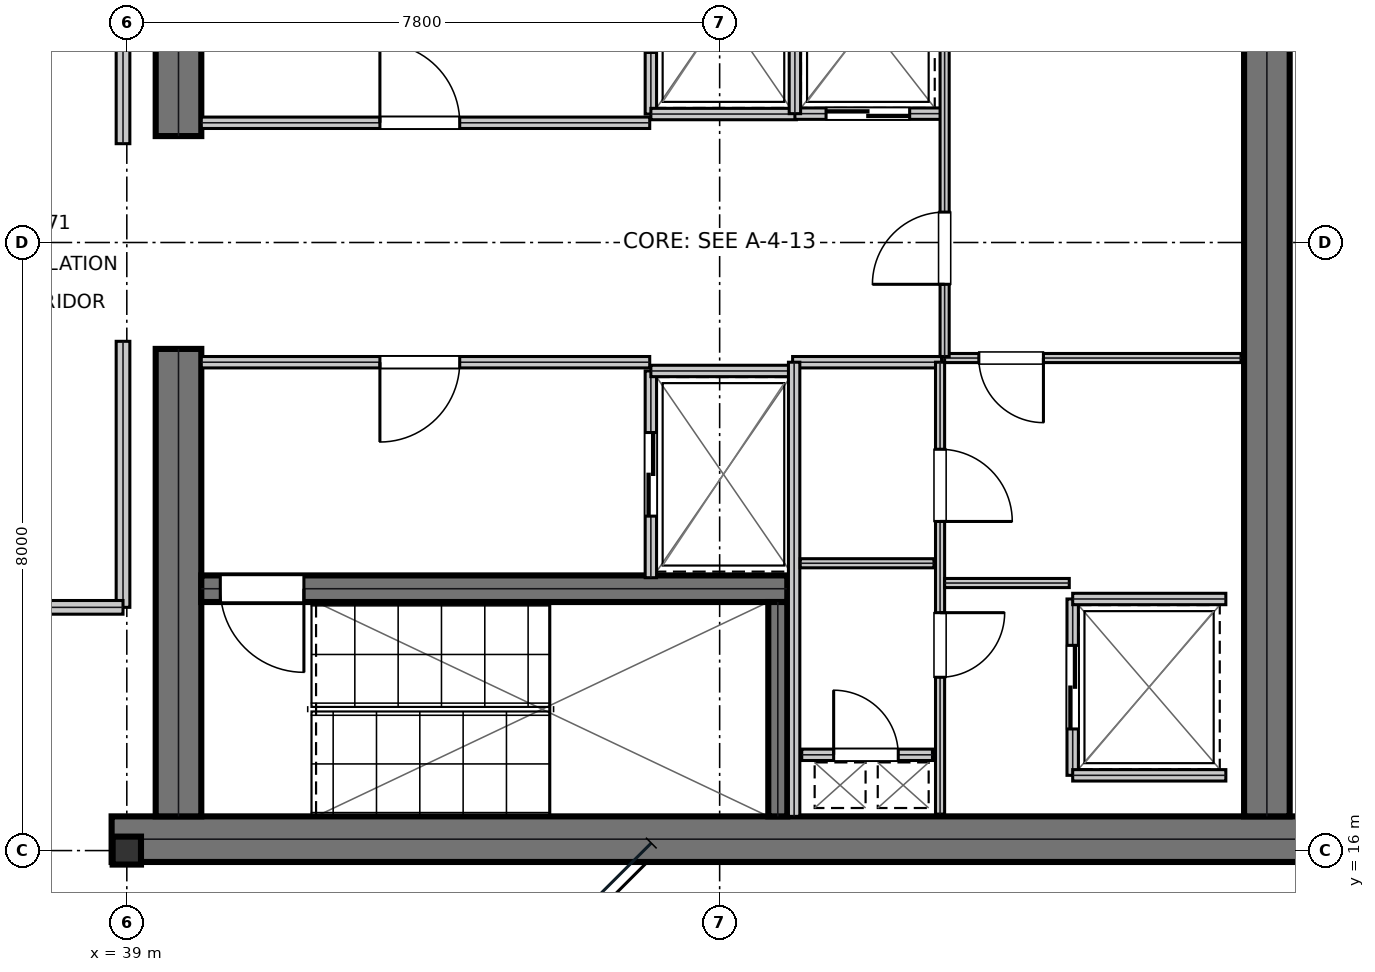
"""IFC4 building model, lengths in metres.
Left out: names, types, materials, properties, quantities, classifications, styles, units other than length and angle.
Written with IfcOpenShell. Run it as: python <this file> out.ifc"""

import sys

from ifc_helpers import new_model, si_unit, direction, frame, frame_2d, origin, origin_2d, place, context, subcontext, project, spatial, rectangle, i_section, extrude, element, fill, save


model = new_model("IFC4")
c1 = context("Model", 3, precision=1e-05, world=origin(), true_north=direction((0.0, 1.0)))
c2 = subcontext(c1, "Body", "Model", "MODEL_VIEW")
j1 = project(units=[si_unit("LENGTHUNIT", "METRE"), si_unit("PLANEANGLEUNIT", "RADIAN")], contexts=[c1])
p1 = place(None, origin())
s1 = spatial("IfcSite", under=j1, at=p1, CompositionType="ELEMENT")
p2 = place(p1, origin())
s2 = spatial("IfcBuilding", under=s1, at=p2, CompositionType="ELEMENT")
p3 = place(p2, frame((0.0, 0.0, 303.3)))
s3 = spatial("IfcBuildingStorey", under=s2, at=p3, CompositionType="ELEMENT", Elevation=303.3)
p4 = place(p3, frame((38.8, 16.15, 0.0), z_axis=(0.0, 0.0, 1.0), x_axis=(1.0, 0.0, 0.0)))
e1 = element("IfcWall", 1, at=p4, inside=s3, PredefinedType="SHEAR", context=c2, shape_type="SweptSolid", body=[
    extrude(rectangle(XDim=16.0, YDim=0.6, at=frame_2d((8.0, 0.0))), origin(), (0.0, 0.0, 1.0), 3.81),
])
for number, where, z_axis, x_axis in (
    (2, (39.68, 16.45, 0.0), (0.0, 0.0, 1.0), (0.0, 1.0, 0.0)),
    (3, (39.68, 25.4, 0.0), (0.0, 0.0, 1.0), (0.0, 1.0, 0.0)),
):
    element("IfcWall", number, at=place(p3, frame(where, z_axis=z_axis, x_axis=x_axis)), inside=s3, PredefinedType="SHEAR", context=c2, shape_type="SweptSolid", body=[
        extrude(rectangle(XDim=6.15, YDim=0.6, at=frame_2d((3.075, 0.0))), origin(), (0.0, 0.0, 1.0), 3.81),
    ])
p5 = place(p3, frame((54.0, 16.45, 0.0), z_axis=(0.0, 0.0, 1.0), x_axis=(0.0, 1.0, 0.0)))
e4 = element("IfcWall", 4, at=p5, inside=s3, PredefinedType="SHEAR", context=c2, shape_type="SweptSolid", body=[
    extrude(rectangle(XDim=15.1, YDim=0.6, at=frame_2d((7.55, 0.0))), origin(), (0.0, 0.0, 1.0), 3.81),
])
p6 = place(p3, frame((39.98, 19.445, 0.0), z_axis=(0.0, 0.0, 1.0), x_axis=(1.0, 0.0, 0.0)))
e5 = element("IfcWall", 5, at=p6, inside=s3, PredefinedType="SHEAR", context=c2, shape_type="SweptSolid", body=[
    extrude(rectangle(XDim=7.71, YDim=0.35, at=frame_2d((3.855, 0.0))), origin(), (0.0, 0.0, 1.0), 3.81),
])
p7 = place(p6, frame((0.25, 0.0, 0.0)))
e6 = element("IfcOpeningElement", 6, at=p7, cuts=e5, PredefinedType="OPENING", context=c2, shape_type="SweptSolid", body=[
    extrude(rectangle(XDim=1.1, YDim=2.15, at=frame_2d((0.55, 1.075))), frame((0.0, 0.185, 0.0), z_axis=(0.0, -1.0, 0.0), x_axis=(1.0, 0.0, 0.0)), (0.0, 0.0, 1.0), 0.37),
])
p8 = place(p3, frame((47.565, 16.45, 0.0), z_axis=(0.0, 0.0, 1.0), x_axis=(0.0, 1.0, 0.0)))
e7 = element("IfcWall", 7, at=p8, inside=s3, PredefinedType="SHEAR", context=c2, shape_type="SweptSolid", body=[
    extrude(rectangle(XDim=2.82, YDim=0.25, at=frame_2d((1.41, 0.0))), origin(), (0.0, 0.0, 1.0), 3.81),
])
p9 = place(p3, frame((39.0, 16.0, 0.0), z_axis=(0.0, 0.0, 1.0), x_axis=(1.0, 0.0, 0.0)))
e8 = element("IfcColumn", 8, at=p9, inside=s3, PredefinedType="COLUMN", context=c2, shape_type="SweptSolid", body=[
    extrude(i_section(OverallWidth=0.373, OverallDepth=0.368, WebThickness=0.015, FlangeThickness=0.024, at=origin_2d()), origin(), (0.0, 0.0, 1.0), 4.044),
])
p10 = place(p3, frame((39.98, 25.575, 0.0), z_axis=(0.0, 0.0, 1.0), x_axis=(1.0, 0.0, 0.0)))
e9 = element("IfcWall", 9, at=p10, inside=s3, PredefinedType="PARTITIONING", context=c2, shape_type="SweptSolid", body=[
    extrude(rectangle(XDim=5.9, YDim=0.15, at=frame_2d((2.95, 0.0))), origin(), (0.0, 0.0, 1.0), 3.81),
])
p11 = place(p10, frame((2.35, 0.0, 0.0)))
e10 = element("IfcOpeningElement", 10, at=p11, cuts=e9, PredefinedType="OPENING", context=c2, shape_type="SweptSolid", body=[
    extrude(rectangle(XDim=1.05, YDim=2.15, at=frame_2d((0.525, 1.075))), frame((0.0, 0.085, 0.0), z_axis=(0.0, -1.0, 0.0), x_axis=(1.0, 0.0, 0.0)), (0.0, 0.0, 1.0), 0.17),
])
p12 = place(p3, frame((39.98, 22.425, 0.0), z_axis=(0.0, 0.0, 1.0), x_axis=(1.0, 0.0, 0.0)))
e11 = element("IfcWall", 11, at=p12, inside=s3, PredefinedType="PARTITIONING", context=c2, shape_type="SweptSolid", body=[
    extrude(rectangle(XDim=5.9, YDim=0.15, at=frame_2d((2.95, 0.0))), origin(), (0.0, 0.0, 1.0), 3.81),
])
p13 = place(p12, frame((2.35, 0.0, 0.0)))
e12 = element("IfcOpeningElement", 12, at=p13, cuts=e11, PredefinedType="OPENING", context=c2, shape_type="SweptSolid", body=[
    extrude(rectangle(XDim=1.05, YDim=2.15, at=frame_2d((0.525, 1.075))), frame((0.0, 0.085, 0.0), z_axis=(0.0, -1.0, 0.0), x_axis=(1.0, 0.0, 0.0)), (0.0, 0.0, 1.0), 0.17),
])
p14 = place(p3, frame((45.895, 25.69, 0.0), z_axis=(0.0, 0.0, 1.0), x_axis=(0.0, 1.0, 0.0)))
e13 = element("IfcWall", 13, at=p14, inside=s3, PredefinedType="PARTITIONING", context=c2, shape_type="SweptSolid", body=[
    extrude(rectangle(XDim=2.72, YDim=0.15, at=frame_2d((1.36, 0.0))), origin(), (0.0, 0.0, 1.0), 3.81),
])
p15 = place(p14, frame((0.81, 0.0, 0.0)))
e14 = element("IfcOpeningElement", 14, at=p15, cuts=e13, PredefinedType="OPENING", context=c2, shape_type="SweptSolid", body=[
    extrude(rectangle(XDim=1.1, YDim=2.15, at=frame_2d((0.55, 1.075))), frame((0.0, 0.085, 0.0), z_axis=(0.0, -1.0, 0.0), x_axis=(1.0, 0.0, 0.0)), (0.0, 0.0, 1.0), 0.17),
])
p16 = place(p3, frame((45.895, 25.69, 0.0), z_axis=(0.0, 0.0, 1.0), x_axis=(1.0, 0.0, 0.0)))
e15 = element("IfcWall", 15, at=p16, inside=s3, PredefinedType="PARTITIONING", context=c2, shape_type="SweptSolid", body=[
    extrude(rectangle(XDim=1.915, YDim=0.15, at=frame_2d((0.958, 0.0))), origin(), (0.0, 0.0, 1.0), 3.81),
])
p17 = place(p3, frame((45.895, 19.59, 0.0), z_axis=(0.0, 0.0, 1.0), x_axis=(0.0, 1.0, 0.0)))
e16 = element("IfcWall", 16, at=p17, inside=s3, PredefinedType="PARTITIONING", context=c2, shape_type="SweptSolid", body=[
    extrude(rectangle(XDim=2.72, YDim=0.15, at=frame_2d((1.36, 0.0))), origin(), (0.0, 0.0, 1.0), 3.81),
])
p18 = place(p17, frame((0.81, 0.0, 0.0)))
e17 = element("IfcOpeningElement", 17, at=p18, cuts=e16, PredefinedType="OPENING", context=c2, shape_type="SweptSolid", body=[
    extrude(rectangle(XDim=1.1, YDim=2.15, at=frame_2d((0.55, 1.075))), frame((0.0, 0.085, 0.0), z_axis=(0.0, -1.0, 0.0), x_axis=(1.0, 0.0, 0.0)), (0.0, 0.0, 1.0), 0.17),
])
p19 = place(p3, frame((45.895, 22.31, 0.0), z_axis=(0.0, 0.0, 1.0), x_axis=(1.0, 0.0, 0.0)))
e18 = element("IfcWall", 18, at=p19, inside=s3, PredefinedType="PARTITIONING", context=c2, shape_type="SweptSolid", body=[
    extrude(rectangle(XDim=1.915, YDim=0.15, at=frame_2d((0.958, 0.0))), origin(), (0.0, 0.0, 1.0), 3.81),
])
p20 = place(p3, frame((47.79, 25.695, 0.0), z_axis=(0.0, 0.0, 1.0), x_axis=(1.0, 0.0, 0.0)))
e19 = element("IfcWall", 19, at=p20, inside=s3, PredefinedType="PARTITIONING", context=c2, shape_type="SweptSolid", body=[
    extrude(rectangle(XDim=1.92, YDim=0.15, at=frame_2d((0.96, 0.0))), origin(), (0.0, 0.0, 1.0), 3.81),
])
p21 = place(p20, frame((0.41, 0.0, 0.0)))
e20 = element("IfcOpeningElement", 20, at=p21, cuts=e19, PredefinedType="OPENING", context=c2, shape_type="SweptSolid", body=[
    extrude(rectangle(XDim=1.1, YDim=2.15, at=frame_2d((0.55, 1.075))), frame((0.0, 0.085, 0.0), z_axis=(0.0, -1.0, 0.0), x_axis=(1.0, 0.0, 0.0)), (0.0, 0.0, 1.0), 0.17),
])
p22 = place(p3, frame((47.79, 25.695, 0.0), z_axis=(0.0, 0.0, 1.0), x_axis=(0.0, 1.0, 0.0)))
e21 = element("IfcWall", 21, at=p22, inside=s3, PredefinedType="PARTITIONING", context=c2, shape_type="SweptSolid", body=[
    extrude(rectangle(XDim=2.415, YDim=0.15, at=frame_2d((1.208, 0.0))), origin(), (0.0, 0.0, 1.0), 3.81),
])
p23 = place(p3, frame((51.445, 16.99, 0.0), z_axis=(0.0, 0.0, 1.0), x_axis=(0.0, 1.0, 0.0)))
e22 = element("IfcWall", 22, at=p23, inside=s3, PredefinedType="PARTITIONING", context=c2, shape_type="SweptSolid", body=[
    extrude(rectangle(XDim=2.32, YDim=0.15, at=frame_2d((1.16, 0.0))), origin(), (0.0, 0.0, 1.0), 3.81),
])
p24 = place(p23, frame((0.61, 0.0, 0.0)))
e23 = element("IfcOpeningElement", 23, at=p24, cuts=e22, PredefinedType="OPENING", context=c2, shape_type="SweptSolid", body=[
    extrude(rectangle(XDim=1.1, YDim=2.15, at=frame_2d((0.55, 1.075))), frame((0.0, 0.085, 0.0), z_axis=(0.0, -1.0, 0.0), x_axis=(1.0, 0.0, 0.0)), (0.0, 0.0, 1.0), 0.17),
])
for number, where, z_axis, x_axis in (
    (24, (51.445, 16.99, 0.0), (0.0, 0.0, 1.0), (1.0, 0.0, 0.0)),
    (25, (51.445, 19.31, 0.0), (0.0, 0.0, 1.0), (1.0, 0.0, 0.0)),
):
    element("IfcWall", number, at=place(p3, frame(where, z_axis=z_axis, x_axis=x_axis)), inside=s3, PredefinedType="PARTITIONING", context=c2, shape_type="SweptSolid", body=[
        extrude(rectangle(XDim=2.015, YDim=0.15, at=frame_2d((1.007, 0.0))), origin(), (0.0, 0.0, 1.0), 3.81),
    ])
p25 = place(p3, frame((47.88, 17.26, 0.0), z_axis=(0.0, 0.0, 1.0), x_axis=(1.0, 0.0, 0.0)))
e26 = element("IfcWall", 26, at=p25, inside=s3, PredefinedType="PARTITIONING", context=c2, shape_type="SweptSolid", body=[
    extrude(rectangle(XDim=1.72, YDim=0.15, at=frame_2d((0.86, 0.0))), origin(), (0.0, 0.0, 1.0), 3.81),
])
p26 = place(p25, frame((0.42, 0.0, 0.0)))
e27 = element("IfcOpeningElement", 27, at=p26, cuts=e26, PredefinedType="OPENING", context=c2, shape_type="SweptSolid", body=[
    extrude(rectangle(XDim=0.85, YDim=2.15, at=frame_2d((0.425, 1.075))), frame((0.0, 0.085, 0.0), z_axis=(0.0, -1.0, 0.0), x_axis=(1.0, 0.0, 0.0)), (0.0, 0.0, 1.0), 0.17),
])
p27 = place(p3, frame((47.76, 22.425, 0.0), z_axis=(0.0, 0.0, 1.0), x_axis=(1.0, 0.0, 0.0)))
e28 = element("IfcWall", 28, at=p27, inside=s3, PredefinedType="PARTITIONING", context=c2, shape_type="SweptSolid", body=[
    extrude(rectangle(XDim=1.96, YDim=0.15, at=frame_2d((0.98, 0.0))), origin(), (0.0, 0.0, 1.0), 3.81),
])
p28 = place(p3, frame((47.78, 16.45, 0.0), z_axis=(0.0, 0.0, 1.0), x_axis=(0.0, 1.0, 0.0)))
e29 = element("IfcWall", 29, at=p28, inside=s3, PredefinedType="PARTITIONING", context=c2, shape_type="SweptSolid", body=[
    extrude(rectangle(XDim=5.975, YDim=0.15, at=frame_2d((2.988, 0.0))), origin(), (0.0, 0.0, 1.0), 3.81),
])
p29 = place(p3, frame((47.86, 19.78, 0.0), z_axis=(0.0, 0.0, 1.0), x_axis=(1.0, 0.0, 0.0)))
e30 = element("IfcWall", 30, at=p29, inside=s3, PredefinedType="PARTITIONING", context=c2, shape_type="SweptSolid", body=[
    extrude(rectangle(XDim=1.76, YDim=0.12, at=frame_2d((0.88, 0.0))), origin(), (0.0, 0.0, 1.0), 3.81),
])
p30 = place(p3, frame((49.7, 16.48, 0.0), z_axis=(0.0, 0.0, 1.0), x_axis=(0.0, 1.0, 0.0)))
e31 = element("IfcWall", 31, at=p30, inside=s3, PredefinedType="PARTITIONING", context=c2, shape_type="SweptSolid", body=[
    extrude(rectangle(XDim=5.945, YDim=0.12, at=frame_2d((2.973, 0.0))), origin(), (0.0, 0.0, 1.0), 3.81),
])
p31 = place(p30, frame((1.8, 0.0, 0.0)))
e32 = element("IfcOpeningElement", 32, at=p31, cuts=e31, PredefinedType="OPENING", context=c2, shape_type="SweptSolid", body=[
    extrude(rectangle(XDim=0.85, YDim=2.15, at=frame_2d((0.425, 1.075))), frame((0.0, 0.07, 0.0), z_axis=(0.0, -1.0, 0.0), x_axis=(1.0, 0.0, 0.0)), (0.0, 0.0, 1.0), 0.14),
])
p32 = place(p30, frame((3.85, 0.0, 0.0)))
e33 = element("IfcOpeningElement", 33, at=p32, cuts=e31, PredefinedType="OPENING", context=c2, shape_type="SweptSolid", body=[
    extrude(rectangle(XDim=0.95, YDim=2.15, at=frame_2d((0.475, 1.075))), frame((0.0, 0.07, 0.0), z_axis=(0.0, -1.0, 0.0), x_axis=(1.0, 0.0, 0.0)), (0.0, 0.0, 1.0), 0.14),
])
p33 = place(p3, frame((49.76, 22.48, 0.0), z_axis=(0.0, 0.0, 1.0), x_axis=(1.0, 0.0, 0.0)))
e34 = element("IfcWall", 34, at=p33, inside=s3, PredefinedType="PARTITIONING", context=c2, shape_type="SweptSolid", body=[
    extrude(rectangle(XDim=3.9, YDim=0.12, at=frame_2d((1.95, 0.0))), origin(), (0.0, 0.0, 1.0), 3.81),
])
p34 = place(p33, frame((0.45, 0.0, 0.0)))
e35 = element("IfcOpeningElement", 35, at=p34, cuts=e34, PredefinedType="OPENING", context=c2, shape_type="SweptSolid", body=[
    extrude(rectangle(XDim=0.85, YDim=2.15, at=frame_2d((0.425, 1.075))), frame((0.0, 0.07, 0.0), z_axis=(0.0, -1.0, 0.0), x_axis=(1.0, 0.0, 0.0)), (0.0, 0.0, 1.0), 0.14),
])
p35 = place(p3, frame((49.76, 19.52, 0.0), z_axis=(0.0, 0.0, 1.0), x_axis=(1.0, 0.0, 0.0)))
e36 = element("IfcWall", 36, at=p35, inside=s3, PredefinedType="PARTITIONING", context=c2, shape_type="SweptSolid", body=[
    extrude(rectangle(XDim=1.64, YDim=0.12, at=frame_2d((0.82, 0.0))), origin(), (0.0, 0.0, 1.0), 3.81),
])
p36 = place(p3, frame((49.76, 22.5, 0.0), z_axis=(0.0, 0.0, 1.0), x_axis=(0.0, 1.0, 0.0)))
e37 = element("IfcWall", 37, at=p36, inside=s3, PredefinedType="PARTITIONING", context=c2, shape_type="SweptSolid", body=[
    extrude(rectangle(XDim=5.72, YDim=0.12, at=frame_2d((2.86, 0.0))), origin(), (0.0, 0.0, 1.0), 3.81),
])
p37 = place(p36, frame((0.95, 0.0, 0.0)))
e38 = element("IfcOpeningElement", 38, at=p37, cuts=e37, PredefinedType="OPENING", context=c2, shape_type="SweptSolid", body=[
    extrude(rectangle(XDim=0.95, YDim=2.15, at=frame_2d((0.475, 1.075))), frame((0.0, 0.07, 0.0), z_axis=(0.0, -1.0, 0.0), x_axis=(1.0, 0.0, 0.0)), (0.0, 0.0, 1.0), 0.14),
])
p38 = place(p3, frame((38.95, 19.2, 0.0), z_axis=(0.0, 0.0, 1.0), x_axis=(0.0, 1.0, 0.0)))
e39 = element("IfcWall", 39, at=p38, inside=s3, PredefinedType="SOLIDWALL", context=c2, shape_type="SweptSolid", body=[
    extrude(rectangle(XDim=3.5, YDim=0.18, at=frame_2d((1.75, 0.0))), origin(), (0.0, 0.0, 1.0), 3.54),
])
p39 = place(p3, frame((37.05, 19.2, 0.0), z_axis=(0.0, 0.0, 1.0), x_axis=(1.0, 0.0, 0.0)))
e40 = element("IfcWall", 40, at=p39, inside=s3, PredefinedType="SOLIDWALL", context=c2, shape_type="SweptSolid", body=[
    extrude(rectangle(XDim=1.9, YDim=0.18, at=frame_2d((0.95, 0.0))), origin(), (0.0, 0.0, 1.0), 3.81),
])
p40 = place(p3, frame((38.95, 25.3, 0.0), z_axis=(0.0, 0.0, 1.0), x_axis=(0.0, 1.0, 0.0)))
e41 = element("IfcWall", 41, at=p40, inside=s3, PredefinedType="SOLIDWALL", context=c2, shape_type="SweptSolid", body=[
    extrude(rectangle(XDim=3.5, YDim=0.18, at=frame_2d((1.75, 0.0))), origin(), (0.0, 0.0, 1.0), 3.54),
])
p41 = place(p11, origin())
e42 = element("IfcDoor", 42, at=p41, inside=s3, OperationType="SINGLE_SWING_LEFT", PredefinedType="DOOR", context=c2, shape_type="SweptSolid", body=[
    extrude(rectangle(XDim=1.05, YDim=2.15, at=frame_2d((0.525, 1.075))), frame((0.0, 0.025, 0.0), z_axis=(0.0, -1.0, 0.0), x_axis=(1.0, 0.0, 0.0)), (0.0, 0.0, 1.0), 0.05),
])
fill(e10, e42)
p42 = place(p13, frame((1.05, 0.0, 0.0), z_axis=(0.0, 0.0, 1.0), x_axis=(-1.0, 0.0, 0.0)))
e43 = element("IfcDoor", 43, at=p42, inside=s3, OperationType="SINGLE_SWING_RIGHT", PredefinedType="DOOR", context=c2, shape_type="SweptSolid", body=[
    extrude(rectangle(XDim=1.05, YDim=2.15, at=frame_2d((0.525, 1.075))), frame((0.0, 0.025, 0.0), z_axis=(0.0, -1.0, 0.0), x_axis=(1.0, 0.0, 0.0)), (0.0, 0.0, 1.0), 0.05),
])
fill(e12, e43)
p43 = place(p18, frame((1.1, 0.0, 0.0), z_axis=(0.0, 0.0, 1.0), x_axis=(-1.0, 0.0, 0.0)))
e44 = element("IfcDoor", 44, at=p43, inside=s3, OperationType="DOUBLE_DOOR_SLIDING", PredefinedType="DOOR", context=c2, shape_type="SweptSolid", body=[
    extrude(rectangle(XDim=1.1, YDim=2.15, at=frame_2d((0.55, 1.075))), frame((0.0, 0.025, 0.0), z_axis=(0.0, -1.0, 0.0), x_axis=(1.0, 0.0, 0.0)), (0.0, 0.0, 1.0), 0.05),
])
fill(e17, e44)
p44 = place(p21, frame((1.1, 0.0, 0.0), z_axis=(0.0, 0.0, 1.0), x_axis=(-1.0, 0.0, 0.0)))
e45 = element("IfcDoor", 45, at=p44, inside=s3, OperationType="DOUBLE_DOOR_SLIDING", PredefinedType="DOOR", context=c2, shape_type="SweptSolid", body=[
    extrude(rectangle(XDim=1.1, YDim=2.15, at=frame_2d((0.55, 1.075))), frame((0.0, 0.025, 0.0), z_axis=(0.0, -1.0, 0.0), x_axis=(1.0, 0.0, 0.0)), (0.0, 0.0, 1.0), 0.05),
])
fill(e20, e45)
p45 = place(p24, frame((1.1, 0.0, 0.0), z_axis=(0.0, 0.0, 1.0), x_axis=(-1.0, 0.0, 0.0)))
e46 = element("IfcDoor", 46, at=p45, inside=s3, OperationType="DOUBLE_DOOR_SLIDING", PredefinedType="DOOR", context=c2, shape_type="SweptSolid", body=[
    extrude(rectangle(XDim=1.1, YDim=2.15, at=frame_2d((0.55, 1.075))), frame((0.0, 0.025, 0.0), z_axis=(0.0, -1.0, 0.0), x_axis=(1.0, 0.0, 0.0)), (0.0, 0.0, 1.0), 0.05),
])
fill(e23, e46)
p46 = place(p26, origin())
e47 = element("IfcDoor", 47, at=p46, inside=s3, OperationType="SINGLE_SWING_LEFT", PredefinedType="TRAPDOOR", context=c2, shape_type="SweptSolid", body=[
    extrude(rectangle(XDim=0.85, YDim=2.15, at=frame_2d((0.425, 1.075))), frame((0.0, 0.025, 0.0), z_axis=(0.0, -1.0, 0.0), x_axis=(1.0, 0.0, 0.0)), (0.0, 0.0, 1.0), 0.05),
])
fill(e27, e47)
p47 = place(p31, frame((0.85, 0.0, 0.0), z_axis=(0.0, 0.0, 1.0), x_axis=(-1.0, 0.0, 0.0)))
e48 = element("IfcDoor", 48, at=p47, inside=s3, OperationType="SINGLE_SWING_LEFT", PredefinedType="DOOR", context=c2, shape_type="SweptSolid", body=[
    extrude(rectangle(XDim=0.85, YDim=2.15, at=frame_2d((0.425, 1.075))), frame((0.0, 0.025, 0.0), z_axis=(0.0, -1.0, 0.0), x_axis=(1.0, 0.0, 0.0)), (0.0, 0.0, 1.0), 0.05),
])
fill(e32, e48)
p48 = place(p32, frame((0.95, 0.0, 0.0), z_axis=(0.0, 0.0, 1.0), x_axis=(-1.0, 0.0, 0.0)))
e49 = element("IfcDoor", 49, at=p48, inside=s3, OperationType="SINGLE_SWING_RIGHT", PredefinedType="DOOR", context=c2, shape_type="SweptSolid", body=[
    extrude(rectangle(XDim=0.95, YDim=2.15, at=frame_2d((0.475, 1.075))), frame((0.0, 0.025, 0.0), z_axis=(0.0, -1.0, 0.0), x_axis=(1.0, 0.0, 0.0)), (0.0, 0.0, 1.0), 0.05),
])
fill(e33, e49)
p49 = place(p34, frame((0.85, 0.0, 0.0), z_axis=(0.0, 0.0, 1.0), x_axis=(-1.0, 0.0, 0.0)))
e50 = element("IfcDoor", 50, at=p49, inside=s3, OperationType="SINGLE_SWING_LEFT", PredefinedType="DOOR", context=c2, shape_type="SweptSolid", body=[
    extrude(rectangle(XDim=0.85, YDim=2.15, at=frame_2d((0.425, 1.075))), frame((0.0, 0.025, 0.0), z_axis=(0.0, -1.0, 0.0), x_axis=(1.0, 0.0, 0.0)), (0.0, 0.0, 1.0), 0.05),
])
fill(e35, e50)
p50 = place(p37, origin())
e51 = element("IfcDoor", 51, at=p50, inside=s3, OperationType="SINGLE_SWING_LEFT", PredefinedType="DOOR", context=c2, shape_type="SweptSolid", body=[
    extrude(rectangle(XDim=0.95, YDim=2.15, at=frame_2d((0.475, 1.075))), frame((0.0, 0.025, 0.0), z_axis=(0.0, -1.0, 0.0), x_axis=(1.0, 0.0, 0.0)), (0.0, 0.0, 1.0), 0.05),
])
fill(e38, e51)
p51 = place(p7, frame((1.1, 0.0, 0.0), z_axis=(0.0, 0.0, 1.0), x_axis=(-1.0, 0.0, 0.0)))
e52 = element("IfcDoor", 52, at=p51, inside=s3, OperationType="SINGLE_SWING_LEFT", PredefinedType="DOOR", context=c2, shape_type="SweptSolid", body=[
    extrude(rectangle(XDim=1.1, YDim=2.15, at=frame_2d((0.55, 1.075))), frame((0.0, 0.025, 0.0), z_axis=(0.0, -1.0, 0.0), x_axis=(1.0, 0.0, 0.0)), (0.0, 0.0, 1.0), 0.05),
])
fill(e6, e52)
save(model, sys.argv[1])
